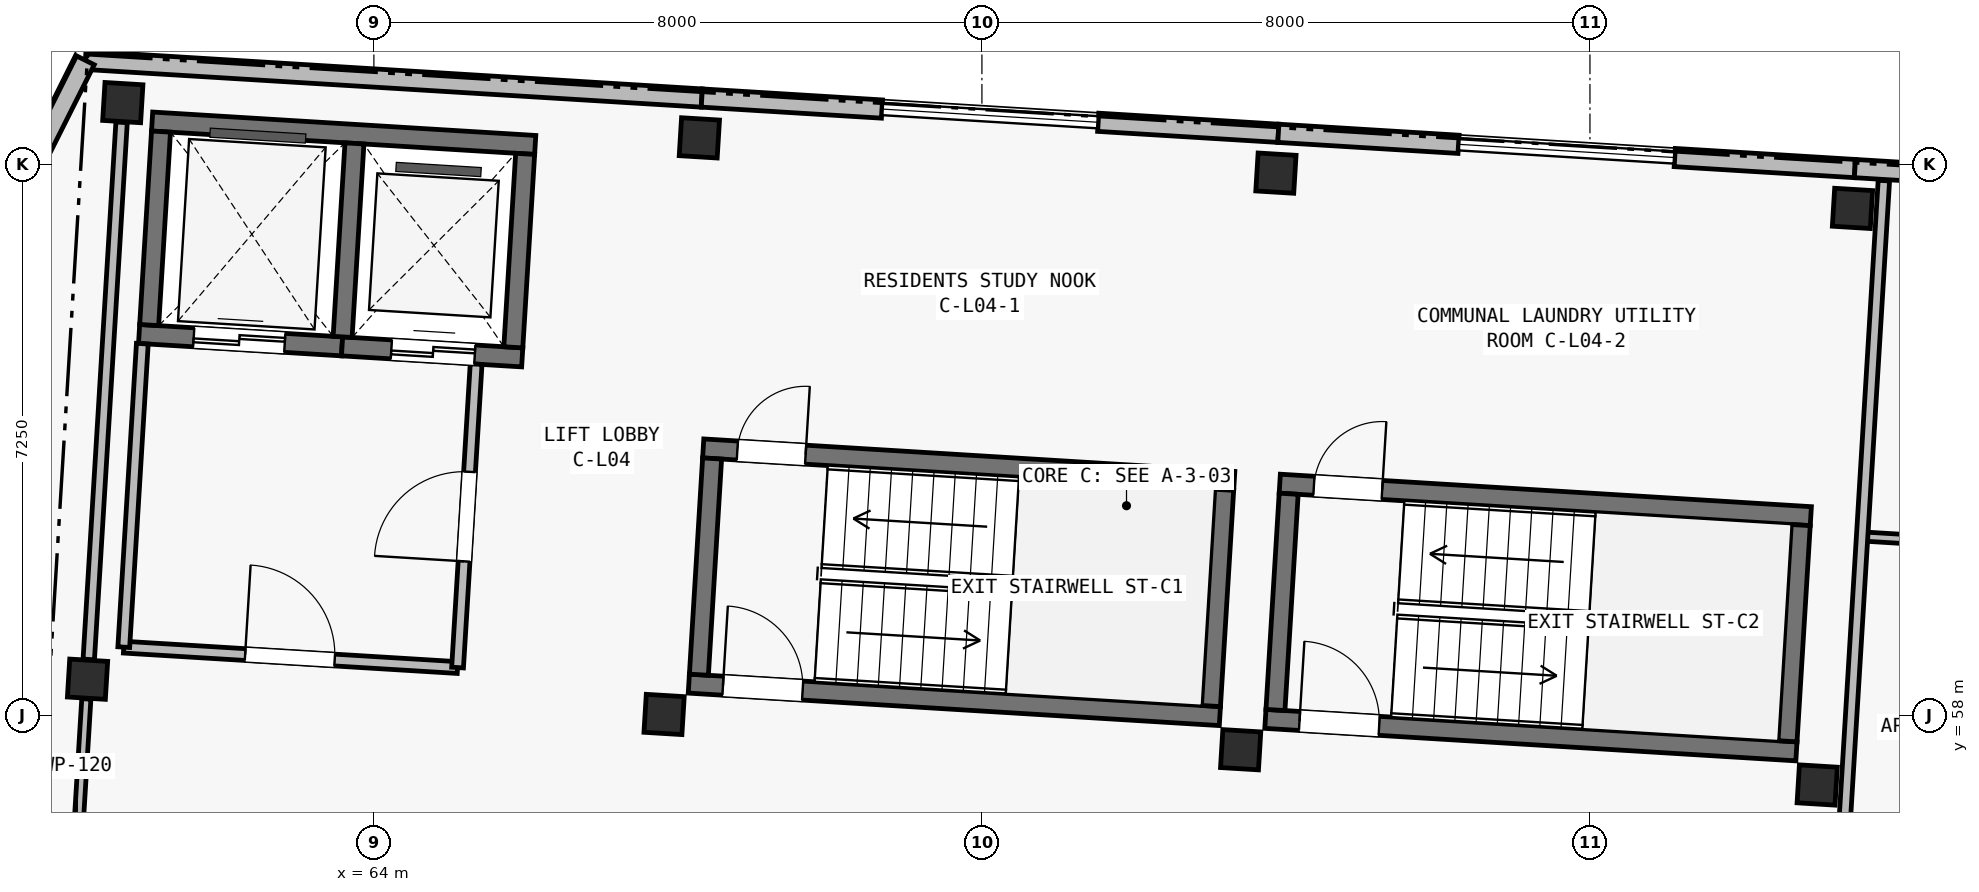
"""IFC4 building model, lengths in metres.
Left out: names, types, materials, properties, quantities, classifications, styles, units other than length and angle.
Written with IfcOpenShell. Run it as: python <this file> out.ifc"""

import sys

from ifc_helpers import new_model, si_unit, direction, frame, frame_2d, origin, origin_2d, place, context, subcontext, project, spatial, rectangle, extrude, element, fill, save


model = new_model("IFC4")
c1 = context("Model", 3, precision=1e-05, world=origin(), true_north=direction((0.0, 1.0)))
c2 = subcontext(c1, "Body", "Model", "MODEL_VIEW")
j1 = project(units=[si_unit("LENGTHUNIT", "METRE"), si_unit("PLANEANGLEUNIT", "RADIAN")], contexts=[c1])
p1 = place(None, origin())
s1 = spatial("IfcSite", under=j1, at=p1, CompositionType="ELEMENT")
p2 = place(p1, origin())
s2 = spatial("IfcBuilding", under=s1, at=p2, CompositionType="ELEMENT")
p3 = place(p2, frame((0.0, 0.0, 14.9)))
s3 = spatial("IfcBuildingStorey", under=s2, at=p3, CompositionType="ELEMENT", Elevation=14.9)
for number, where, z_axis, x_axis in (
    (1, (60.233, 58.478, 0.0), (0.0, 0.0, 1.0), (0.998, -0.061, 0.0)),
    (2, (60.697, 66.063, 0.0), (0.0, 0.0, 1.0), (0.998, -0.061, 0.0)),
    (3, (67.818, 58.014, 0.0), (0.0, 0.0, 1.0), (0.998, -0.061, 0.0)),
    (4, (68.282, 65.599, 0.0), (0.0, 0.0, 1.0), (0.998, -0.061, 0.0)),
    (5, (75.404, 57.55, 0.0), (0.0, 0.0, 1.0), (0.998, -0.061, 0.0)),
    (6, (75.868, 65.135, 0.0), (0.0, 0.0, 1.0), (0.998, -0.061, 0.0)),
    (7, (82.99, 57.086, 0.0), (0.0, 0.0, 1.0), (0.998, -0.061, 0.0)),
    (8, (83.454, 64.672, 0.0), (0.0, 0.0, 1.0), (0.998, -0.061, 0.0)),
):
    element("IfcColumn", number, at=place(p3, frame(where, z_axis=z_axis, x_axis=x_axis)), inside=s3, PredefinedType="COLUMN", context=c2, shape_type="SweptSolid", body=[
        extrude(rectangle(XDim=0.5, YDim=0.5, at=origin_2d()), origin(), (0.0, 0.0, 1.0), 3.25),
    ])
p4 = place(p3, frame((61.082, 65.814, 0.0), z_axis=(0.0, 0.0, 1.0), x_axis=(0.998134101522, -0.061059932685, 0.0)))
e9 = element("IfcWall", 9, at=p4, inside=s3, PredefinedType="SHEAR", context=c2, shape_type="SweptSolid", body=[
    extrude(rectangle(XDim=5.05, YDim=0.25, at=frame_2d((2.525, 0.0))), origin(), (0.0, 0.0, 1.0), 3.25),
])
p5 = place(p3, frame((60.911, 63.02, 0.0), z_axis=(0.0, 0.0, 1.0), x_axis=(0.998134099905, -0.061059959111, 0.0)))
e10 = element("IfcWall", 10, at=p5, inside=s3, PredefinedType="SHEAR", context=c2, shape_type="SweptSolid", body=[
    extrude(rectangle(XDim=2.675, YDim=0.25, at=frame_2d((1.337, 0.0))), origin(), (0.0, 0.0, 1.0), 3.25),
])
p6 = place(p5, frame((0.72, 0.0, 0.0)))
e11 = element("IfcOpeningElement", 11, at=p6, cuts=e10, PredefinedType="OPENING", context=c2, shape_type="SweptSolid", body=[
    extrude(rectangle(XDim=1.2, YDim=2.2, at=frame_2d((0.6, 1.1))), frame((0.0, 0.14, 0.0), z_axis=(0.0, -1.0, 0.0), x_axis=(1.0, 0.0, 0.0)), (0.0, 0.0, 1.0), 0.28),
])
p7 = place(p3, frame((63.581, 62.856, 0.0), z_axis=(0.0, 0.0, 1.0), x_axis=(0.998134103342, -0.061059902923, 0.0)))
e12 = element("IfcWall", 12, at=p7, inside=s3, PredefinedType="SHEAR", context=c2, shape_type="SweptSolid", body=[
    extrude(rectangle(XDim=2.375, YDim=0.25, at=frame_2d((1.188, 0.0))), origin(), (0.0, 0.0, 1.0), 3.25),
])
p8 = place(p7, frame((0.65, 0.0, 0.0)))
e13 = element("IfcOpeningElement", 13, at=p8, cuts=e12, PredefinedType="OPENING", context=c2, shape_type="SweptSolid", body=[
    extrude(rectangle(XDim=1.1, YDim=2.15, at=frame_2d((0.55, 1.075))), frame((0.0, 0.14, 0.0), z_axis=(0.0, -1.0, 0.0), x_axis=(1.0, 0.0, 0.0)), (0.0, 0.0, 1.0), 0.28),
])
p9 = place(p3, frame((61.043, 63.137, 0.0), z_axis=(0.0, 0.0, 1.0), x_axis=(0.061078919587, 0.998132939834, 0.0)))
e14 = element("IfcWall", 14, at=p9, inside=s3, PredefinedType="SHEAR", context=c2, shape_type="SweptSolid", body=[
    extrude(rectangle(XDim=2.55, YDim=0.25, at=frame_2d((1.275, 0.0))), origin(), (0.0, 0.0, 1.0), 3.25),
])
p10 = place(p3, frame((63.589, 62.981, 0.0), z_axis=(0.0, 0.0, 1.0), x_axis=(0.060989368901, 0.998138415692, 0.0)))
e15 = element("IfcWall", 15, at=p10, inside=s3, PredefinedType="SHEAR", context=c2, shape_type="SweptSolid", body=[
    extrude(rectangle(XDim=2.55, YDim=0.25, at=frame_2d((1.275, 0.0))), origin(), (0.0, 0.0, 1.0), 3.25),
])
p11 = place(p3, frame((65.834, 62.844, 0.0), z_axis=(0.0, 0.0, 1.0), x_axis=(0.061084756616, 0.998132582631, 0.0)))
e16 = element("IfcWall", 16, at=p11, inside=s3, PredefinedType="SHEAR", context=c2, shape_type="SweptSolid", body=[
    extrude(rectangle(XDim=2.55, YDim=0.25, at=frame_2d((1.275, 0.0))), origin(), (0.0, 0.0, 1.0), 3.25),
])
p12 = place(p3, frame((68.333, 61.514, 0.0), z_axis=(0.0, 0.0, 1.0), x_axis=(0.998135676081, -0.061034188237, 0.0)))
e17 = element("IfcWall", 17, at=p12, inside=s3, PredefinedType="SHEAR", context=c2, shape_type="SweptSolid", body=[
    extrude(rectangle(XDim=7.0, YDim=0.25, at=frame_2d((3.5, 0.0))), origin(), (0.0, 0.0, 1.0), 3.25),
])
p13 = place(p12, frame((0.45, 0.0, 0.0)))
e18 = element("IfcOpeningElement", 18, at=p13, cuts=e17, PredefinedType="OPENING", context=c2, shape_type="SweptSolid", body=[
    extrude(rectangle(XDim=0.9, YDim=2.1, at=frame_2d((0.45, 1.05))), frame((0.0, 0.14, 0.0), z_axis=(0.0, -1.0, 0.0), x_axis=(1.0, 0.0, 0.0)), (0.0, 0.0, 1.0), 0.28),
])
p14 = place(p3, frame((68.144, 58.419, 0.0), z_axis=(0.0, 0.0, 1.0), x_axis=(0.998135546153, -0.061036313012, 0.0)))
e19 = element("IfcWall", 19, at=p14, inside=s3, PredefinedType="SHEAR", context=c2, shape_type="SweptSolid", body=[
    extrude(rectangle(XDim=7.0, YDim=0.25, at=frame_2d((3.5, 0.0))), origin(), (0.0, 0.0, 1.0), 3.25),
])
p15 = place(p14, frame((0.45, 0.0, 0.0)))
e20 = element("IfcOpeningElement", 20, at=p15, cuts=e19, PredefinedType="OPENING", context=c2, shape_type="SweptSolid", body=[
    extrude(rectangle(XDim=1.05, YDim=2.15, at=frame_2d((0.525, 1.075))), frame((0.0, 0.14, 0.0), z_axis=(0.0, -1.0, 0.0), x_axis=(1.0, 0.0, 0.0)), (0.0, 0.0, 1.0), 0.28),
])
for number, where, z_axis, x_axis in (
    (21, (68.276, 58.537, 0.0), (0.0, 0.0, 1.0), (0.061, 0.998, 0.0)),
    (22, (75.014, 58.125, 0.0), (0.0, 0.0, 1.0), (0.061, 0.998, 0.0)),
):
    element("IfcWall", number, at=place(p3, frame(where, z_axis=z_axis, x_axis=x_axis)), inside=s3, PredefinedType="SHEAR", context=c2, shape_type="SweptSolid", body=[
        extrude(rectangle(XDim=2.85, YDim=0.25, at=frame_2d((1.425, 0.0))), origin(), (0.0, 0.0, 1.0), 3.25),
    ])
p16 = place(p3, frame((75.919, 61.05, 0.0), z_axis=(0.0, 0.0, 1.0), x_axis=(0.998135546153, -0.061036313012, 0.0)))
e23 = element("IfcWall", 23, at=p16, inside=s3, PredefinedType="SHEAR", context=c2, shape_type="SweptSolid", body=[
    extrude(rectangle(XDim=7.0, YDim=0.25, at=frame_2d((3.5, 0.0))), origin(), (0.0, 0.0, 1.0), 3.25),
])
p17 = place(p16, frame((0.45, 0.0, 0.0)))
e24 = element("IfcOpeningElement", 24, at=p17, cuts=e23, PredefinedType="OPENING", context=c2, shape_type="SweptSolid", body=[
    extrude(rectangle(XDim=0.9, YDim=2.1, at=frame_2d((0.45, 1.05))), frame((0.0, 0.14, 0.0), z_axis=(0.0, -1.0, 0.0), x_axis=(1.0, 0.0, 0.0)), (0.0, 0.0, 1.0), 0.28),
])
p18 = place(p3, frame((75.73, 57.956, 0.0), z_axis=(0.0, 0.0, 1.0), x_axis=(0.998135546153, -0.061036313012, 0.0)))
e25 = element("IfcWall", 25, at=p18, inside=s3, PredefinedType="SHEAR", context=c2, shape_type="SweptSolid", body=[
    extrude(rectangle(XDim=7.0, YDim=0.25, at=frame_2d((3.5, 0.0))), origin(), (0.0, 0.0, 1.0), 3.25),
])
p19 = place(p18, frame((0.45, 0.0, 0.0)))
e26 = element("IfcOpeningElement", 26, at=p19, cuts=e25, PredefinedType="OPENING", context=c2, shape_type="SweptSolid", body=[
    extrude(rectangle(XDim=1.05, YDim=2.15, at=frame_2d((0.525, 1.075))), frame((0.0, 0.14, 0.0), z_axis=(0.0, -1.0, 0.0), x_axis=(1.0, 0.0, 0.0)), (0.0, 0.0, 1.0), 0.28),
])
for number, where, z_axis, x_axis in (
    (27, (75.862, 58.073, 0.0), (0.0, 0.0, 1.0), (0.061, 0.998, 0.0)),
    (28, (82.599, 57.661, 0.0), (0.0, 0.0, 1.0), (0.061, 0.998, 0.0)),
):
    element("IfcWall", number, at=place(p3, frame(where, z_axis=z_axis, x_axis=x_axis)), inside=s3, PredefinedType="SHEAR", context=c2, shape_type="SweptSolid", body=[
        extrude(rectangle(XDim=2.85, YDim=0.25, at=frame_2d((1.425, 0.0))), origin(), (0.0, 0.0, 1.0), 3.25),
    ])
p20 = place(p3, frame((60.205, 66.62, 0.0), z_axis=(0.0, 0.0, 1.0), x_axis=(0.998134248939, -0.061057522844, 0.0)))
e29 = element("IfcWall", 29, at=p20, inside=s3, PredefinedType="SOLIDWALL", context=c2, shape_type="SweptSolid", body=[
    extrude(rectangle(XDim=8.125, YDim=0.24, at=frame_2d((4.062, 0.0))), origin(), (0.0, 0.0, 1.0), 3.0),
])
p21 = place(p3, frame((68.314, 66.124, 0.0), z_axis=(0.0, 0.0, 1.0), x_axis=(0.998134103342, -0.061059902923, 0.0)))
e30 = element("IfcWall", 30, at=p21, inside=s3, PredefinedType="SOLIDWALL", context=c2, shape_type="SweptSolid", body=[
    extrude(rectangle(XDim=2.375, YDim=0.24, at=frame_2d((1.188, 0.0))), origin(), (0.0, 0.0, 1.0), 3.0),
])
p22 = place(p3, frame((73.53, 65.804, 0.0), z_axis=(0.0, 0.0, 1.0), x_axis=(0.998133720034, -0.061066168473, 0.0)))
e31 = element("IfcWall", 31, at=p22, inside=s3, PredefinedType="SOLIDWALL", context=c2, shape_type="SweptSolid", body=[
    extrude(rectangle(XDim=2.375, YDim=0.24, at=frame_2d((1.188, 0.0))), origin(), (0.0, 0.0, 1.0), 3.0),
])
for number, where, z_axis, x_axis in (
    (32, (75.9, 65.659, 0.0), (0.0, 0.0, 1.0), (0.998, -0.061, 0.0)),
    (33, (81.115, 65.341, 0.0), (0.0, 0.0, 1.0), (0.998, -0.061, 0.0)),
):
    element("IfcWall", number, at=place(p3, frame(where, z_axis=z_axis, x_axis=x_axis)), inside=s3, PredefinedType="SOLIDWALL", context=c2, shape_type="SweptSolid", body=[
        extrude(rectangle(XDim=2.375, YDim=0.24, at=frame_2d((1.188, 0.0))), origin(), (0.0, 0.0, 1.0), 3.0),
    ])
p23 = place(p3, frame((83.486, 65.196, 0.0), z_axis=(0.0, 0.0, 1.0), x_axis=(0.998135669243, -0.061034300063, 0.0)))
e34 = element("IfcWall", 34, at=p23, inside=s3, PredefinedType="SOLIDWALL", context=c2, shape_type="SweptSolid", body=[
    extrude(rectangle(XDim=7.6, YDim=0.24, at=frame_2d((3.8, 0.0))), origin(), (0.0, 0.0, 1.0), 3.0),
])
p24 = place(p23, frame((1.424, 0.0, 0.5)))
e35 = element("IfcOpeningElement", 35, at=p24, cuts=e34, PredefinedType="OPENING", context=c2, shape_type="SweptSolid", body=[
    extrude(rectangle(XDim=0.64, YDim=2.18, at=frame_2d((0.32, 1.09))), frame((0.0, 0.135, 0.0), z_axis=(0.0, -1.0, 0.0), x_axis=(1.0, 0.0, 0.0)), (0.0, 0.0, 1.0), 0.27),
])
p25 = place(p23, frame((5.935, 0.0, 0.44)))
e36 = element("IfcOpeningElement", 36, at=p25, cuts=e34, PredefinedType="OPENING", context=c2, shape_type="SweptSolid", body=[
    extrude(rectangle(XDim=0.72, YDim=2.16, at=frame_2d((0.36, 1.08))), frame((0.0, 0.135, 0.0), z_axis=(0.0, -1.0, 0.0), x_axis=(1.0, 0.0, 0.0)), (0.0, 0.0, 1.0), 0.27),
])
p26 = place(p3, frame((51.654, 49.585, 0.0), z_axis=(0.0, 0.0, 1.0), x_axis=(0.448621989068, 0.893721607059, 0.0)))
e37 = element("IfcWall", 37, at=p26, inside=s3, PredefinedType="SOLIDWALL", context=c2, shape_type="SweptSolid", body=[
    extrude(rectangle(XDim=19.061, YDim=0.26, at=frame_2d((9.53, 0.0))), origin(), (0.0, 0.0, 1.0), 3.0),
])
p27 = place(p26, frame((2.45, 0.0, 0.45)))
e38 = element("IfcOpeningElement", 38, at=p27, cuts=e37, PredefinedType="OPENING", context=c2, shape_type="SweptSolid", body=[
    extrude(rectangle(XDim=0.76, YDim=2.34, at=frame_2d((0.38, 1.17))), frame((0.0, 0.145, 0.0), z_axis=(0.0, -1.0, 0.0), x_axis=(1.0, 0.0, 0.0)), (0.0, 0.0, 1.0), 0.29),
])
p28 = place(p26, frame((16.01, 0.0, 0.52)))
e39 = element("IfcOpeningElement", 39, at=p28, cuts=e37, PredefinedType="OPENING", context=c2, shape_type="SweptSolid", body=[
    extrude(rectangle(XDim=0.6, YDim=2.22, at=frame_2d((0.3, 1.11))), frame((0.0, 0.145, 0.0), z_axis=(0.0, -1.0, 0.0), x_axis=(1.0, 0.0, 0.0)), (0.0, 0.0, 1.0), 0.29),
])
p29 = place(p3, frame((60.709, 58.899, 0.0), z_axis=(0.0, 0.0, 1.0), x_axis=(0.998132276607, -0.061089756882, 0.0)))
e40 = element("IfcWall", 40, at=p29, inside=s3, PredefinedType="PARTITIONING", context=c2, shape_type="SweptSolid", body=[
    extrude(rectangle(XDim=4.4, YDim=0.155, at=frame_2d((2.2, 0.0))), origin(), (0.0, 0.0, 1.0), 2.97),
])
p30 = place(p29, frame((1.6, 0.0, 0.0)))
e41 = element("IfcOpeningElement", 41, at=p30, cuts=e40, PredefinedType="OPENING", context=c2, shape_type="SweptSolid", body=[
    extrude(rectangle(XDim=1.18, YDim=2.15, at=frame_2d((0.59, 1.075))), frame((0.0, 0.093, 0.0), z_axis=(0.0, -1.0, 0.0), x_axis=(1.0, 0.0, 0.0)), (0.0, 0.0, 1.0), 0.185),
])
p31 = place(p3, frame((60.709, 58.899, 0.0), z_axis=(0.0, 0.0, 1.0), x_axis=(0.061036844229, 0.998135513669, 0.0)))
e42 = element("IfcWall", 42, at=p31, inside=s3, PredefinedType="PARTITIONING", context=c2, shape_type="SweptSolid", body=[
    extrude(rectangle(XDim=4.0, YDim=0.155, at=frame_2d((2.0, 0.0))), origin(), (0.0, 0.0, 1.0), 2.97),
])
p32 = place(p3, frame((65.101, 58.631, 0.0), z_axis=(0.0, 0.0, 1.0), x_axis=(0.061033125904, 0.99813574104, 0.0)))
e43 = element("IfcWall", 43, at=p32, inside=s3, PredefinedType="PARTITIONING", context=c2, shape_type="SweptSolid", body=[
    extrude(rectangle(XDim=4.0, YDim=0.155, at=frame_2d((2.0, 0.0))), origin(), (0.0, 0.0, 1.0), 2.97),
])
p33 = place(p32, frame((1.4, 0.0, 0.0)))
e44 = element("IfcOpeningElement", 44, at=p33, cuts=e43, PredefinedType="OPENING", context=c2, shape_type="SweptSolid", body=[
    extrude(rectangle(XDim=1.18, YDim=2.15, at=frame_2d((0.59, 1.075))), frame((0.0, 0.093, 0.0), z_axis=(0.0, -1.0, 0.0), x_axis=(1.0, 0.0, 0.0)), (0.0, 0.0, 1.0), 0.185),
])
p34 = place(p3, frame((59.98, 54.345, 0.0), z_axis=(0.0, 0.0, 1.0), x_axis=(0.061101107425, 0.998131581843, 0.0)))
e45 = element("IfcWall", 45, at=p34, inside=s3, PredefinedType="PARTITIONING", context=c2, shape_type="SweptSolid", body=[
    extrude(rectangle(XDim=3.88, YDim=0.12, at=frame_2d((1.94, 0.0))), origin(), (0.0, 0.0, 1.0), 2.5),
])
p35 = place(p34, frame((1.35, 0.0, 0.0)))
e46 = element("IfcOpeningElement", 46, at=p35, cuts=e45, PredefinedType="OPENING", context=c2, shape_type="SweptSolid", body=[
    extrude(rectangle(XDim=0.9, YDim=2.1, at=frame_2d((0.45, 1.05))), frame((0.0, 0.075, 0.0), z_axis=(0.0, -1.0, 0.0), x_axis=(1.0, 0.0, 0.0)), (0.0, 0.0, 1.0), 0.15),
])
p36 = place(p3, frame((60.249, 58.737, 0.0), z_axis=(0.0, 0.0, 1.0), x_axis=(0.061034344288, 0.998135666539, 0.0)))
e47 = element("IfcWall", 47, at=p36, inside=s3, PredefinedType="PARTITIONING", context=c2, shape_type="SweptSolid", body=[
    extrude(rectangle(XDim=7.08, YDim=0.15, at=frame_2d((3.54, 0.0))), origin(), (0.0, 0.0, 1.0), 2.5),
])
p37 = place(p3, frame((83.581, 60.356, 0.0), z_axis=(0.0, 0.0, 1.0), x_axis=(0.998133350094, -0.061072214879, 0.0)))
e48 = element("IfcWall", 48, at=p37, inside=s3, PredefinedType="PARTITIONING", context=c2, shape_type="SweptSolid", body=[
    extrude(rectangle(XDim=3.41, YDim=0.12, at=frame_2d((1.705, 0.0))), origin(), (0.0, 0.0, 1.0), 2.97),
])
p38 = place(p37, frame((1.255, 0.0, 0.0)))
e49 = element("IfcOpeningElement", 49, at=p38, cuts=e48, PredefinedType="OPENING", context=c2, shape_type="SweptSolid", body=[
    extrude(rectangle(XDim=0.9, YDim=2.1, at=frame_2d((0.45, 1.05))), frame((0.0, 0.075, 0.0), z_axis=(0.0, -1.0, 0.0), x_axis=(1.0, 0.0, 0.0)), (0.0, 0.0, 1.0), 0.15),
])
p39 = place(p3, frame((83.265, 55.185, 0.0), z_axis=(0.0, 0.0, 1.0), x_axis=(0.061046193261, 0.998134941923, 0.0)))
e50 = element("IfcWall", 50, at=p39, inside=s3, PredefinedType="PARTITIONING", context=c2, shape_type="SweptSolid", body=[
    extrude(rectangle(XDim=9.87, YDim=0.15, at=frame_2d((4.935, 0.0))), origin(), (0.0, 0.0, 1.0), 2.97),
])
p40 = place(p30, origin())
e51 = element("IfcDoor", 51, at=p40, inside=s3, OperationType="SINGLE_SWING_LEFT", PredefinedType="DOOR", context=c2, shape_type="SweptSolid", body=[
    extrude(rectangle(XDim=1.18, YDim=2.15, at=frame_2d((0.59, 1.075))), frame((0.0, 0.025, 0.0), z_axis=(0.0, -1.0, 0.0), x_axis=(1.0, 0.0, 0.0)), (0.0, 0.0, 1.0), 0.05),
])
fill(e41, e51)
p41 = place(p33, origin())
e52 = element("IfcDoor", 52, at=p41, inside=s3, OperationType="SINGLE_SWING_LEFT", PredefinedType="DOOR", context=c2, shape_type="SweptSolid", body=[
    extrude(rectangle(XDim=1.18, YDim=2.15, at=frame_2d((0.59, 1.075))), frame((0.0, 0.025, 0.0), z_axis=(0.0, -1.0, 0.0), x_axis=(1.0, 0.0, 0.0)), (0.0, 0.0, 1.0), 0.05),
])
fill(e44, e52)
p42 = place(p15, origin())
e53 = element("IfcDoor", 53, at=p42, inside=s3, OperationType="SINGLE_SWING_LEFT", PredefinedType="DOOR", context=c2, shape_type="SweptSolid", body=[
    extrude(rectangle(XDim=1.05, YDim=2.15, at=frame_2d((0.525, 1.075))), frame((0.0, 0.025, 0.0), z_axis=(0.0, -1.0, 0.0), x_axis=(1.0, 0.0, 0.0)), (0.0, 0.0, 1.0), 0.05),
])
fill(e20, e53)
p43 = place(p13, origin())
e54 = element("IfcDoor", 54, at=p43, inside=s3, OperationType="SINGLE_SWING_RIGHT", PredefinedType="DOOR", context=c2, shape_type="SweptSolid", body=[
    extrude(rectangle(XDim=0.9, YDim=2.1, at=frame_2d((0.45, 1.05))), frame((0.0, 0.025, 0.0), z_axis=(0.0, -1.0, 0.0), x_axis=(1.0, 0.0, 0.0)), (0.0, 0.0, 1.0), 0.05),
])
fill(e18, e54)
p44 = place(p19, origin())
e55 = element("IfcDoor", 55, at=p44, inside=s3, OperationType="SINGLE_SWING_LEFT", PredefinedType="DOOR", context=c2, shape_type="SweptSolid", body=[
    extrude(rectangle(XDim=1.05, YDim=2.15, at=frame_2d((0.525, 1.075))), frame((0.0, 0.025, 0.0), z_axis=(0.0, -1.0, 0.0), x_axis=(1.0, 0.0, 0.0)), (0.0, 0.0, 1.0), 0.05),
])
fill(e26, e55)
p45 = place(p17, origin())
e56 = element("IfcDoor", 56, at=p45, inside=s3, OperationType="SINGLE_SWING_RIGHT", PredefinedType="DOOR", context=c2, shape_type="SweptSolid", body=[
    extrude(rectangle(XDim=0.9, YDim=2.1, at=frame_2d((0.45, 1.05))), frame((0.0, 0.025, 0.0), z_axis=(0.0, -1.0, 0.0), x_axis=(1.0, 0.0, 0.0)), (0.0, 0.0, 1.0), 0.05),
])
fill(e24, e56)
p46 = place(p6, origin())
e57 = element("IfcDoor", 57, at=p46, inside=s3, OperationType="DOUBLE_DOOR_SLIDING", PredefinedType="DOOR", context=c2, shape_type="SweptSolid", body=[
    extrude(rectangle(XDim=1.2, YDim=2.2, at=frame_2d((0.6, 1.1))), frame((0.0, 0.025, 0.0), z_axis=(0.0, -1.0, 0.0), x_axis=(1.0, 0.0, 0.0)), (0.0, 0.0, 1.0), 0.05),
])
fill(e11, e57)
p47 = place(p8, origin())
e58 = element("IfcDoor", 58, at=p47, inside=s3, OperationType="DOUBLE_DOOR_SLIDING", PredefinedType="DOOR", context=c2, shape_type="SweptSolid", body=[
    extrude(rectangle(XDim=1.1, YDim=2.15, at=frame_2d((0.55, 1.075))), frame((0.0, 0.025, 0.0), z_axis=(0.0, -1.0, 0.0), x_axis=(1.0, 0.0, 0.0)), (0.0, 0.0, 1.0), 0.05),
])
fill(e13, e58)
save(model, sys.argv[1])
